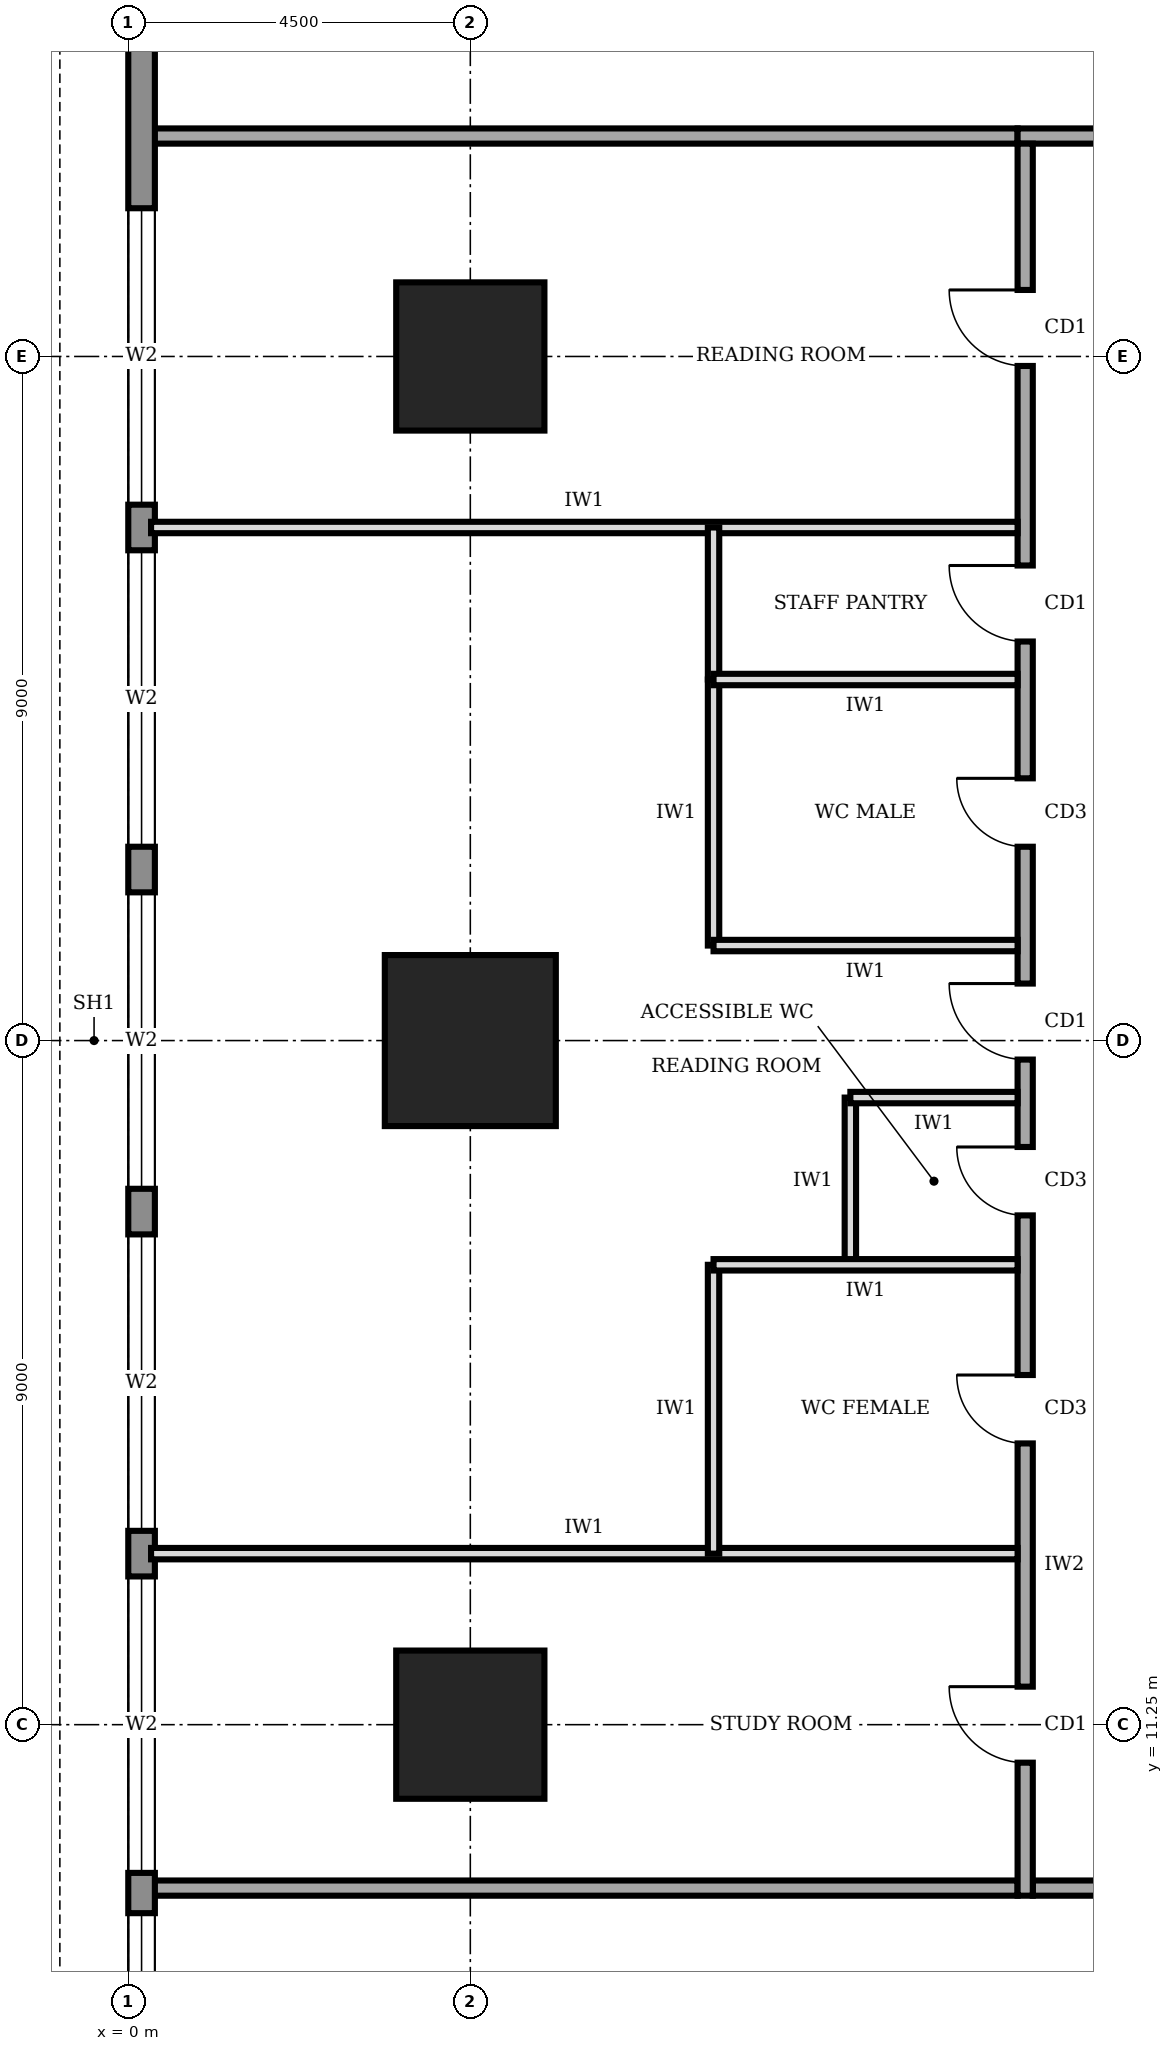
"""IFC4 building model, lengths in metres.
Left out: names, types, materials, properties, quantities, classifications, styles, units other than length and angle.
Written with IfcOpenShell. Run it as: python <this file> out.ifc"""

import sys

from ifc_helpers import new_model, si_unit, direction, frame, frame_2d, origin, origin_2d, place, context, subcontext, project, spatial, rectangle, extrude, element, fill, save


model = new_model("IFC4")
c1 = context("Model", 3, precision=1e-05, world=origin(), true_north=direction((0.0, 1.0)))
c2 = subcontext(c1, "Body", "Model", "MODEL_VIEW")
j1 = project(units=[si_unit("LENGTHUNIT", "METRE"), si_unit("PLANEANGLEUNIT", "RADIAN")], contexts=[c1])
p1 = place(None, origin())
s1 = spatial("IfcSite", under=j1, at=p1, CompositionType="ELEMENT")
p2 = place(p1, origin())
s2 = spatial("IfcBuilding", under=s1, at=p2, CompositionType="ELEMENT")
p3 = place(p2, frame((0.0, 0.0, 237.0)))
s3 = spatial("IfcBuildingStorey", under=s2, at=p3, CompositionType="ELEMENT", Elevation=237.0)
p4 = place(p3, frame((4.5, 11.25, 0.0), z_axis=(0.0, 0.0, 1.0), x_axis=(1.0, 0.0, 0.0)))
e1 = element("IfcColumn", 1, at=p4, inside=s3, PredefinedType="COLUMN", context=c2, shape_type="SweptSolid", body=[
    extrude(rectangle(XDim=1.95, YDim=1.95, at=origin_2d()), origin(), (0.0, 0.0, 1.0), 4.0),
])
p5 = place(p3, frame((4.5, 20.25, 0.0), z_axis=(0.0, 0.0, 1.0), x_axis=(1.0, 0.0, 0.0)))
e2 = element("IfcColumn", 2, at=p5, inside=s3, PredefinedType="COLUMN", context=c2, shape_type="SweptSolid", body=[
    extrude(rectangle(XDim=2.25, YDim=2.25, at=origin_2d()), origin(), (0.0, 0.0, 1.0), 4.0),
])
p6 = place(p3, frame((4.5, 29.25, 0.0), z_axis=(0.0, 0.0, 1.0), x_axis=(1.0, 0.0, 0.0)))
e3 = element("IfcColumn", 3, at=p6, inside=s3, PredefinedType="COLUMN", context=c2, shape_type="SweptSolid", body=[
    extrude(rectangle(XDim=1.95, YDim=1.95, at=origin_2d()), origin(), (0.0, 0.0, 1.0), 4.0),
])
p7 = place(p3, frame((0.175, 35.98, 0.0), z_axis=(0.0, 0.0, 1.0), x_axis=(0.0, -1.0, 0.0)))
e4 = element("IfcWall", 4, at=p7, inside=s3, PredefinedType="STANDARD", context=c2, shape_type="SweptSolid", body=[
    extrude(rectangle(XDim=31.46, YDim=0.35, at=frame_2d((15.73, 0.0))), origin(), (0.0, 0.0, 1.0), 3.75),
])
p8 = place(p7, frame((27.21, 0.0, 0.6)))
e5 = element("IfcOpeningElement", 5, at=p8, cuts=e4, PredefinedType="OPENING", context=c2, shape_type="SweptSolid", body=[
    extrude(rectangle(XDim=3.9, YDim=2.6, at=frame_2d((1.95, 1.3))), frame((0.0, 0.185, 0.0), z_axis=(0.0, -1.0, 0.0), x_axis=(1.0, 0.0, 0.0)), (0.0, 0.0, 1.0), 0.37),
])
p9 = place(p7, frame((22.78, 0.0, 0.6)))
e6 = element("IfcOpeningElement", 6, at=p9, cuts=e4, PredefinedType="OPENING", context=c2, shape_type="SweptSolid", body=[
    extrude(rectangle(XDim=3.9, YDim=2.6, at=frame_2d((1.95, 1.3))), frame((0.0, 0.185, 0.0), z_axis=(0.0, -1.0, 0.0), x_axis=(1.0, 0.0, 0.0)), (0.0, 0.0, 1.0), 0.37),
])
p10 = place(p7, frame((18.28, 0.0, 0.6)))
e7 = element("IfcOpeningElement", 7, at=p10, cuts=e4, PredefinedType="OPENING", context=c2, shape_type="SweptSolid", body=[
    extrude(rectangle(XDim=3.9, YDim=2.6, at=frame_2d((1.95, 1.3))), frame((0.0, 0.185, 0.0), z_axis=(0.0, -1.0, 0.0), x_axis=(1.0, 0.0, 0.0)), (0.0, 0.0, 1.0), 0.37),
])
p11 = place(p7, frame((13.78, 0.0, 0.6)))
e8 = element("IfcOpeningElement", 8, at=p11, cuts=e4, PredefinedType="OPENING", context=c2, shape_type="SweptSolid", body=[
    extrude(rectangle(XDim=3.9, YDim=2.6, at=frame_2d((1.95, 1.3))), frame((0.0, 0.185, 0.0), z_axis=(0.0, -1.0, 0.0), x_axis=(1.0, 0.0, 0.0)), (0.0, 0.0, 1.0), 0.37),
])
p12 = place(p7, frame((9.28, 0.0, 0.6)))
e9 = element("IfcOpeningElement", 9, at=p12, cuts=e4, PredefinedType="OPENING", context=c2, shape_type="SweptSolid", body=[
    extrude(rectangle(XDim=3.9, YDim=2.6, at=frame_2d((1.95, 1.3))), frame((0.0, 0.185, 0.0), z_axis=(0.0, -1.0, 0.0), x_axis=(1.0, 0.0, 0.0)), (0.0, 0.0, 1.0), 0.37),
])
p13 = place(p7, frame((4.78, 0.0, 0.6)))
e10 = element("IfcOpeningElement", 10, at=p13, cuts=e4, PredefinedType="OPENING", context=c2, shape_type="SweptSolid", body=[
    extrude(rectangle(XDim=3.9, YDim=2.6, at=frame_2d((1.95, 1.3))), frame((0.0, 0.185, 0.0), z_axis=(0.0, -1.0, 0.0), x_axis=(1.0, 0.0, 0.0)), (0.0, 0.0, 1.0), 0.37),
])
p14 = place(p3, frame((11.9, 9.1, 0.0), z_axis=(0.0, 0.0, 1.0), x_axis=(1.0, 0.0, 0.0)))
e11 = element("IfcWall", 11, at=p14, inside=s3, PredefinedType="SOLIDWALL", context=c2, shape_type="SweptSolid", body=[
    extrude(rectangle(XDim=16.9, YDim=0.2, at=frame_2d((8.45, 0.0))), origin(), (0.0, 0.0, 1.0), 3.75),
])
p15 = place(p3, frame((28.6, 32.15, 0.0), z_axis=(0.0, 0.0, 1.0), x_axis=(-1.0, 0.0, 0.0)))
e12 = element("IfcWall", 12, at=p15, inside=s3, PredefinedType="SOLIDWALL", context=c2, shape_type="SweptSolid", body=[
    extrude(rectangle(XDim=16.9, YDim=0.2, at=frame_2d((8.45, 0.0))), origin(), (0.0, 0.0, 1.0), 3.75),
])
p16 = place(p15, frame((0.275, 0.0, 0.0)))
e13 = element("IfcOpeningElement", 13, at=p16, cuts=e12, PredefinedType="OPENING", context=c2, shape_type="SweptSolid", body=[
    extrude(rectangle(XDim=1.0, YDim=2.1, at=frame_2d((0.5, 1.05))), frame((0.0, 0.11, 0.0), z_axis=(0.0, -1.0, 0.0), x_axis=(1.0, 0.0, 0.0)), (0.0, 0.0, 1.0), 0.22),
])
p17 = place(p3, frame((11.8, 32.05, 0.0), z_axis=(0.0, 0.0, 1.0), x_axis=(0.0, -1.0, 0.0)))
e14 = element("IfcWall", 14, at=p17, inside=s3, PredefinedType="SOLIDWALL", context=c2, shape_type="SweptSolid", body=[
    extrude(rectangle(XDim=23.05, YDim=0.2, at=frame_2d((11.525, 0.0))), origin(), (0.0, 0.0, 1.0), 3.75),
])
p18 = place(p17, frame((20.3, 0.0, 0.0)))
e15 = element("IfcOpeningElement", 15, at=p18, cuts=e14, PredefinedType="OPENING", context=c2, shape_type="SweptSolid", body=[
    extrude(rectangle(XDim=1.0, YDim=2.1, at=frame_2d((0.5, 1.05))), frame((0.0, 0.11, 0.0), z_axis=(0.0, -1.0, 0.0), x_axis=(1.0, 0.0, 0.0)), (0.0, 0.0, 1.0), 0.22),
])
p19 = place(p17, frame((16.2, 0.0, 0.0)))
e16 = element("IfcOpeningElement", 16, at=p19, cuts=e14, PredefinedType="OPENING", context=c2, shape_type="SweptSolid", body=[
    extrude(rectangle(XDim=0.9, YDim=2.1, at=frame_2d((0.45, 1.05))), frame((0.0, 0.11, 0.0), z_axis=(0.0, -1.0, 0.0), x_axis=(1.0, 0.0, 0.0)), (0.0, 0.0, 1.0), 0.22),
])
p20 = place(p17, frame((13.2, 0.0, 0.0)))
e17 = element("IfcOpeningElement", 17, at=p20, cuts=e14, PredefinedType="OPENING", context=c2, shape_type="SweptSolid", body=[
    extrude(rectangle(XDim=0.9, YDim=2.1, at=frame_2d((0.45, 1.05))), frame((0.0, 0.11, 0.0), z_axis=(0.0, -1.0, 0.0), x_axis=(1.0, 0.0, 0.0)), (0.0, 0.0, 1.0), 0.22),
])
p21 = place(p17, frame((8.35, 0.0, 0.0)))
e18 = element("IfcOpeningElement", 18, at=p21, cuts=e14, PredefinedType="OPENING", context=c2, shape_type="SweptSolid", body=[
    extrude(rectangle(XDim=0.9, YDim=2.1, at=frame_2d((0.45, 1.05))), frame((0.0, 0.11, 0.0), z_axis=(0.0, -1.0, 0.0), x_axis=(1.0, 0.0, 0.0)), (0.0, 0.0, 1.0), 0.22),
])
p22 = place(p17, frame((5.55, 0.0, 0.0)))
e19 = element("IfcOpeningElement", 19, at=p22, cuts=e14, PredefinedType="OPENING", context=c2, shape_type="SweptSolid", body=[
    extrude(rectangle(XDim=1.0, YDim=2.1, at=frame_2d((0.5, 1.05))), frame((0.0, 0.11, 0.0), z_axis=(0.0, -1.0, 0.0), x_axis=(1.0, 0.0, 0.0)), (0.0, 0.0, 1.0), 0.22),
])
p23 = place(p17, frame((11.05, 0.0, 0.0)))
e20 = element("IfcOpeningElement", 20, at=p23, cuts=e14, PredefinedType="OPENING", context=c2, shape_type="SweptSolid", body=[
    extrude(rectangle(XDim=1.0, YDim=2.1, at=frame_2d((0.5, 1.05))), frame((0.0, 0.11, 0.0), z_axis=(0.0, -1.0, 0.0), x_axis=(1.0, 0.0, 0.0)), (0.0, 0.0, 1.0), 0.22),
])
p24 = place(p17, frame((1.925, 0.0, 0.0)))
e21 = element("IfcOpeningElement", 21, at=p24, cuts=e14, PredefinedType="OPENING", context=c2, shape_type="SweptSolid", body=[
    extrude(rectangle(XDim=1.0, YDim=2.1, at=frame_2d((0.5, 1.05))), frame((0.0, 0.11, 0.0), z_axis=(0.0, -1.0, 0.0), x_axis=(1.0, 0.0, 0.0)), (0.0, 0.0, 1.0), 0.22),
])
for number, where, z_axis, x_axis in (
    (22, (0.3, 9.1, 0.0), (0.0, 0.0, 1.0), (1.0, 0.0, 0.0)),
    (23, (0.3, 32.15, 0.0), (0.0, 0.0, 1.0), (1.0, 0.0, 0.0)),
):
    element("IfcWall", number, at=place(p3, frame(where, z_axis=z_axis, x_axis=x_axis)), inside=s3, PredefinedType="SOLIDWALL", context=c2, shape_type="SweptSolid", body=[
        extrude(rectangle(XDim=11.4, YDim=0.2, at=frame_2d((5.7, 0.0))), origin(), (0.0, 0.0, 1.0), 3.75),
    ])
for number, where, z_axis, x_axis in (
    (24, (0.3, 13.5, 0.0), (0.0, 0.0, 1.0), (1.0, 0.0, 0.0)),
    (25, (0.3, 27.0, 0.0), (0.0, 0.0, 1.0), (1.0, 0.0, 0.0)),
):
    element("IfcWall", number, at=place(p3, frame(where, z_axis=z_axis, x_axis=x_axis)), inside=s3, PredefinedType="PARTITIONING", context=c2, shape_type="SweptSolid", body=[
        extrude(rectangle(XDim=11.4, YDim=0.15, at=frame_2d((5.7, 0.0))), origin(), (0.0, 0.0, 1.0), 3.75),
    ])
p25 = place(p3, frame((11.7, 17.3, 0.0), z_axis=(0.0, 0.0, 1.0), x_axis=(-1.0, 0.0, 0.0)))
e26 = element("IfcWall", 26, at=p25, inside=s3, PredefinedType="PARTITIONING", context=c2, shape_type="SweptSolid", body=[
    extrude(rectangle(XDim=4.0, YDim=0.15, at=frame_2d((2.0, 0.0))), origin(), (0.0, 0.0, 1.0), 3.75),
])
p26 = place(p3, frame((11.7, 19.5, 0.0), z_axis=(0.0, 0.0, 1.0), x_axis=(-1.0, 0.0, 0.0)))
e27 = element("IfcWall", 27, at=p26, inside=s3, PredefinedType="PARTITIONING", context=c2, shape_type="SweptSolid", body=[
    extrude(rectangle(XDim=2.2, YDim=0.15, at=frame_2d((1.1, 0.0))), origin(), (0.0, 0.0, 1.0), 2.85),
])
for number, where, z_axis, x_axis in (
    (28, (11.7, 21.5, 0.0), (0.0, 0.0, 1.0), (-1.0, 0.0, 0.0)),
    (29, (11.7, 25.0, 0.0), (0.0, 0.0, 1.0), (-1.0, 0.0, 0.0)),
):
    element("IfcWall", number, at=place(p3, frame(where, z_axis=z_axis, x_axis=x_axis)), inside=s3, PredefinedType="PARTITIONING", context=c2, shape_type="SweptSolid", body=[
        extrude(rectangle(XDim=4.0, YDim=0.15, at=frame_2d((2.0, 0.0))), origin(), (0.0, 0.0, 1.0), 3.75),
    ])
p27 = place(p3, frame((7.7, 13.5, 0.0), z_axis=(0.0, 0.0, 1.0), x_axis=(0.0, 1.0, 0.0)))
e30 = element("IfcWall", 30, at=p27, inside=s3, PredefinedType="PARTITIONING", context=c2, shape_type="SweptSolid", body=[
    extrude(rectangle(XDim=3.8, YDim=0.15, at=frame_2d((1.9, 0.0))), origin(), (0.0, 0.0, 1.0), 3.75),
])
p28 = place(p3, frame((9.5, 17.3, 0.0), z_axis=(0.0, 0.0, 1.0), x_axis=(0.0, 1.0, 0.0)))
e31 = element("IfcWall", 31, at=p28, inside=s3, PredefinedType="PARTITIONING", context=c2, shape_type="SweptSolid", body=[
    extrude(rectangle(XDim=2.2, YDim=0.15, at=frame_2d((1.1, 0.0))), origin(), (0.0, 0.0, 1.0), 3.75),
])
p29 = place(p3, frame((7.7, 21.5, 0.0), z_axis=(0.0, 0.0, 1.0), x_axis=(0.0, 1.0, 0.0)))
e32 = element("IfcWall", 32, at=p29, inside=s3, PredefinedType="PARTITIONING", context=c2, shape_type="SweptSolid", body=[
    extrude(rectangle(XDim=3.5, YDim=0.15, at=frame_2d((1.75, 0.0))), origin(), (0.0, 0.0, 1.0), 3.75),
])
p30 = place(p3, frame((7.7, 25.0, 0.0), z_axis=(0.0, 0.0, 1.0), x_axis=(0.0, 1.0, 0.0)))
e33 = element("IfcWall", 33, at=p30, inside=s3, PredefinedType="PARTITIONING", context=c2, shape_type="SweptSolid", body=[
    extrude(rectangle(XDim=2.0, YDim=0.15, at=frame_2d((1.0, 0.0))), origin(), (0.0, 0.0, 1.0), 3.75),
])
p31 = place(p8, origin())
e34 = element("IfcWindow", 34, at=p31, inside=s3, PartitioningType="SINGLE_PANEL", PredefinedType="WINDOW", context=c2, shape_type="SweptSolid", body=[
    extrude(rectangle(XDim=3.9, YDim=2.6, at=frame_2d((1.95, 1.3))), frame((0.0, 0.03, 0.0), z_axis=(0.0, -1.0, 0.0), x_axis=(1.0, 0.0, 0.0)), (0.0, 0.0, 1.0), 0.06),
])
fill(e5, e34)
p32 = place(p9, origin())
e35 = element("IfcWindow", 35, at=p32, inside=s3, PartitioningType="SINGLE_PANEL", PredefinedType="WINDOW", context=c2, shape_type="SweptSolid", body=[
    extrude(rectangle(XDim=3.9, YDim=2.6, at=frame_2d((1.95, 1.3))), frame((0.0, 0.03, 0.0), z_axis=(0.0, -1.0, 0.0), x_axis=(1.0, 0.0, 0.0)), (0.0, 0.0, 1.0), 0.06),
])
fill(e6, e35)
p33 = place(p10, origin())
e36 = element("IfcWindow", 36, at=p33, inside=s3, PartitioningType="SINGLE_PANEL", PredefinedType="WINDOW", context=c2, shape_type="SweptSolid", body=[
    extrude(rectangle(XDim=3.9, YDim=2.6, at=frame_2d((1.95, 1.3))), frame((0.0, 0.03, 0.0), z_axis=(0.0, -1.0, 0.0), x_axis=(1.0, 0.0, 0.0)), (0.0, 0.0, 1.0), 0.06),
])
fill(e7, e36)
p34 = place(p11, origin())
e37 = element("IfcWindow", 37, at=p34, inside=s3, PartitioningType="SINGLE_PANEL", PredefinedType="WINDOW", context=c2, shape_type="SweptSolid", body=[
    extrude(rectangle(XDim=3.9, YDim=2.6, at=frame_2d((1.95, 1.3))), frame((0.0, 0.03, 0.0), z_axis=(0.0, -1.0, 0.0), x_axis=(1.0, 0.0, 0.0)), (0.0, 0.0, 1.0), 0.06),
])
fill(e8, e37)
p35 = place(p12, origin())
e38 = element("IfcWindow", 38, at=p35, inside=s3, PartitioningType="SINGLE_PANEL", PredefinedType="WINDOW", context=c2, shape_type="SweptSolid", body=[
    extrude(rectangle(XDim=3.9, YDim=2.6, at=frame_2d((1.95, 1.3))), frame((0.0, 0.03, 0.0), z_axis=(0.0, -1.0, 0.0), x_axis=(1.0, 0.0, 0.0)), (0.0, 0.0, 1.0), 0.06),
])
fill(e9, e38)
p36 = place(p13, origin())
e39 = element("IfcWindow", 39, at=p36, inside=s3, PartitioningType="SINGLE_PANEL", PredefinedType="WINDOW", context=c2, shape_type="SweptSolid", body=[
    extrude(rectangle(XDim=3.9, YDim=2.6, at=frame_2d((1.95, 1.3))), frame((0.0, 0.03, 0.0), z_axis=(0.0, -1.0, 0.0), x_axis=(1.0, 0.0, 0.0)), (0.0, 0.0, 1.0), 0.06),
])
fill(e10, e39)
p37 = place(p18, frame((1.0, 0.0, 0.0), z_axis=(0.0, 0.0, 1.0), x_axis=(-1.0, 0.0, 0.0)))
e40 = element("IfcDoor", 40, at=p37, inside=s3, OperationType="SINGLE_SWING_RIGHT", PredefinedType="DOOR", context=c2, shape_type="SweptSolid", body=[
    extrude(rectangle(XDim=1.0, YDim=2.1, at=frame_2d((0.5, 1.05))), frame((0.0, 0.025, 0.0), z_axis=(0.0, -1.0, 0.0), x_axis=(1.0, 0.0, 0.0)), (0.0, 0.0, 1.0), 0.05),
])
fill(e15, e40)
p38 = place(p19, frame((0.9, 0.0, 0.0), z_axis=(0.0, 0.0, 1.0), x_axis=(-1.0, 0.0, 0.0)))
e41 = element("IfcDoor", 41, at=p38, inside=s3, OperationType="SINGLE_SWING_RIGHT", PredefinedType="DOOR", context=c2, shape_type="SweptSolid", body=[
    extrude(rectangle(XDim=0.9, YDim=2.1, at=frame_2d((0.45, 1.05))), frame((0.0, 0.025, 0.0), z_axis=(0.0, -1.0, 0.0), x_axis=(1.0, 0.0, 0.0)), (0.0, 0.0, 1.0), 0.05),
])
fill(e16, e41)
p39 = place(p20, frame((0.9, 0.0, 0.0), z_axis=(0.0, 0.0, 1.0), x_axis=(-1.0, 0.0, 0.0)))
e42 = element("IfcDoor", 42, at=p39, inside=s3, OperationType="SINGLE_SWING_RIGHT", PredefinedType="DOOR", context=c2, shape_type="SweptSolid", body=[
    extrude(rectangle(XDim=0.9, YDim=2.1, at=frame_2d((0.45, 1.05))), frame((0.0, 0.025, 0.0), z_axis=(0.0, -1.0, 0.0), x_axis=(1.0, 0.0, 0.0)), (0.0, 0.0, 1.0), 0.05),
])
fill(e17, e42)
p40 = place(p21, frame((0.9, 0.0, 0.0), z_axis=(0.0, 0.0, 1.0), x_axis=(-1.0, 0.0, 0.0)))
e43 = element("IfcDoor", 43, at=p40, inside=s3, OperationType="SINGLE_SWING_RIGHT", PredefinedType="DOOR", context=c2, shape_type="SweptSolid", body=[
    extrude(rectangle(XDim=0.9, YDim=2.1, at=frame_2d((0.45, 1.05))), frame((0.0, 0.025, 0.0), z_axis=(0.0, -1.0, 0.0), x_axis=(1.0, 0.0, 0.0)), (0.0, 0.0, 1.0), 0.05),
])
fill(e18, e43)
p41 = place(p22, frame((1.0, 0.0, 0.0), z_axis=(0.0, 0.0, 1.0), x_axis=(-1.0, 0.0, 0.0)))
e44 = element("IfcDoor", 44, at=p41, inside=s3, OperationType="SINGLE_SWING_RIGHT", PredefinedType="DOOR", context=c2, shape_type="SweptSolid", body=[
    extrude(rectangle(XDim=1.0, YDim=2.1, at=frame_2d((0.5, 1.05))), frame((0.0, 0.025, 0.0), z_axis=(0.0, -1.0, 0.0), x_axis=(1.0, 0.0, 0.0)), (0.0, 0.0, 1.0), 0.05),
])
fill(e19, e44)
p42 = place(p23, frame((1.0, 0.0, 0.0), z_axis=(0.0, 0.0, 1.0), x_axis=(-1.0, 0.0, 0.0)))
e45 = element("IfcDoor", 45, at=p42, inside=s3, OperationType="SINGLE_SWING_RIGHT", PredefinedType="DOOR", context=c2, shape_type="SweptSolid", body=[
    extrude(rectangle(XDim=1.0, YDim=2.1, at=frame_2d((0.5, 1.05))), frame((0.0, 0.025, 0.0), z_axis=(0.0, -1.0, 0.0), x_axis=(1.0, 0.0, 0.0)), (0.0, 0.0, 1.0), 0.05),
])
fill(e20, e45)
p43 = place(p24, frame((1.0, 0.0, 0.0), z_axis=(0.0, 0.0, 1.0), x_axis=(-1.0, 0.0, 0.0)))
e46 = element("IfcDoor", 46, at=p43, inside=s3, OperationType="SINGLE_SWING_RIGHT", PredefinedType="DOOR", context=c2, shape_type="SweptSolid", body=[
    extrude(rectangle(XDim=1.0, YDim=2.1, at=frame_2d((0.5, 1.05))), frame((0.0, 0.025, 0.0), z_axis=(0.0, -1.0, 0.0), x_axis=(1.0, 0.0, 0.0)), (0.0, 0.0, 1.0), 0.05),
])
fill(e21, e46)
save(model, sys.argv[1])
